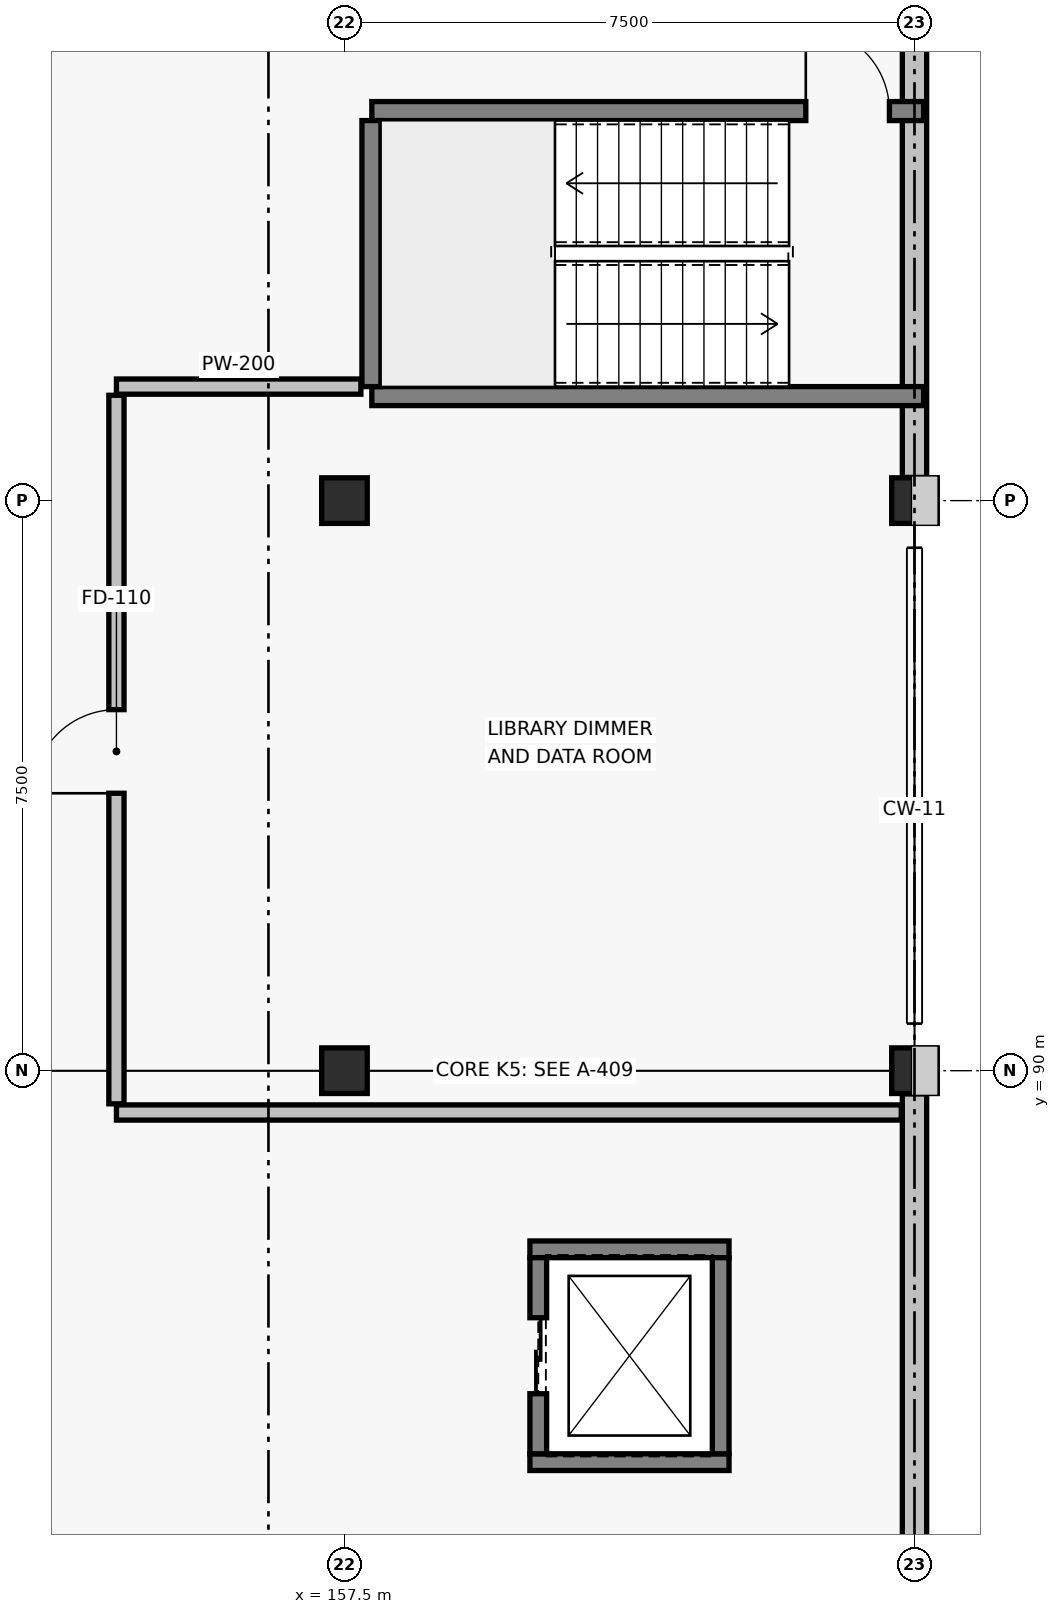
"""IFC4 building model, lengths in metres.
Left out: names, types, materials, properties, quantities, classifications, styles, units other than length and angle.
Written with IfcOpenShell. Run it as: python <this file> out.ifc"""

import sys

from ifc_helpers import new_model, si_unit, direction, frame, frame_2d, origin, origin_2d, place, context, subcontext, project, spatial, rectangle, extrude, element, fill, save


model = new_model("IFC4")
c1 = context("Model", 3, precision=1e-05, world=origin(), true_north=direction((0.0, 1.0)))
c2 = subcontext(c1, "Body", "Model", "MODEL_VIEW")
j1 = project(units=[si_unit("LENGTHUNIT", "METRE"), si_unit("PLANEANGLEUNIT", "RADIAN")], contexts=[c1])
p1 = place(None, origin())
s1 = spatial("IfcSite", under=j1, at=p1, CompositionType="ELEMENT")
p2 = place(p1, origin())
s2 = spatial("IfcBuilding", under=s1, at=p2, CompositionType="ELEMENT")
p3 = place(p2, frame((0.0, 0.0, 9.0)))
s3 = spatial("IfcBuildingStorey", under=s2, at=p3, CompositionType="ELEMENT", Elevation=9.0)
for number, where, z_axis, x_axis in (
    (1, (157.5, 90.0, 0.0), (0.0, 0.0, 1.0), (1.0, 0.0, 0.0)),
    (2, (157.5, 97.5, 0.0), (0.0, 0.0, 1.0), (1.0, 0.0, 0.0)),
    (3, (165.0, 90.0, 0.0), (0.0, 0.0, 1.0), (1.0, 0.0, 0.0)),
    (4, (165.0, 97.5, 0.0), (0.0, 0.0, 1.0), (1.0, 0.0, 0.0)),
):
    element("IfcColumn", number, at=place(p3, frame(where, z_axis=z_axis, x_axis=x_axis)), inside=s3, PredefinedType="COLUMN", context=c2, shape_type="SweptSolid", body=[
        extrude(rectangle(XDim=0.6, YDim=0.6, at=origin_2d()), origin(), (0.0, 0.0, 1.0), 4.2),
    ])
p4 = place(p3, frame((165.0, 82.805, 0.0), z_axis=(0.0, 0.0, 1.0), x_axis=(0.0, 1.0, 0.0)))
e5 = element("IfcWall", 5, at=p4, inside=s3, PredefinedType="SOLIDWALL", context=c2, shape_type="SweptSolid", body=[
    extrude(rectangle(XDim=6.89, YDim=0.32, at=frame_2d((3.445, 0.0))), origin(), (0.0, 0.0, 1.0), 2.82),
])
p5 = place(p3, frame((165.0, 97.805, 0.0), z_axis=(0.0, 0.0, 1.0), x_axis=(0.0, 1.0, 0.0)))
e6 = element("IfcWall", 6, at=p5, inside=s3, PredefinedType="SOLIDWALL", context=c2, shape_type="SweptSolid", body=[
    extrude(rectangle(XDim=6.89, YDim=0.32, at=frame_2d((3.445, 0.0))), origin(), (0.0, 0.0, 1.0), 3.02),
])
p6 = place(p3, frame((157.86, 98.875, 0.0), z_axis=(0.0, 0.0, 1.0), x_axis=(1.0, 0.0, 0.0)))
e7 = element("IfcWall", 7, at=p6, inside=s3, PredefinedType="SOLIDWALL", context=c2, shape_type="SweptSolid", body=[
    extrude(rectangle(XDim=7.26, YDim=0.25, at=frame_2d((3.63, 0.0))), origin(), (0.0, 0.0, 1.0), 3.92),
])
p7 = place(p3, frame((157.86, 102.625, 0.0), z_axis=(0.0, 0.0, 1.0), x_axis=(1.0, 0.0, 0.0)))
e8 = element("IfcWall", 8, at=p7, inside=s3, PredefinedType="SOLIDWALL", context=c2, shape_type="SweptSolid", body=[
    extrude(rectangle(XDim=7.26, YDim=0.25, at=frame_2d((3.63, 0.0))), origin(), (0.0, 0.0, 1.0), 3.92),
])
p8 = place(p7, frame((5.71, 0.0, 0.0)))
e9 = element("IfcOpeningElement", 9, at=p8, cuts=e8, PredefinedType="OPENING", context=c2, shape_type="SweptSolid", body=[
    extrude(rectangle(XDim=1.1, YDim=2.15, at=frame_2d((0.55, 1.075))), frame((0.0, 0.135, 0.0), z_axis=(0.0, -1.0, 0.0), x_axis=(1.0, 0.0, 0.0)), (0.0, 0.0, 1.0), 0.27),
])
p9 = place(p3, frame((157.855, 99.0, 0.0), z_axis=(0.0, 0.0, 1.0), x_axis=(0.0, 1.0, 0.0)))
e10 = element("IfcWall", 10, at=p9, inside=s3, PredefinedType="SOLIDWALL", context=c2, shape_type="SweptSolid", body=[
    extrude(rectangle(XDim=3.5, YDim=0.25, at=frame_2d((1.75, 0.0))), origin(), (0.0, 0.0, 1.0), 3.92),
])
for number, where, z_axis, x_axis in (
    (11, (159.94, 84.85, 0.0), (0.0, 0.0, 1.0), (1.0, 0.0, 0.0)),
    (12, (159.94, 87.65, 0.0), (0.0, 0.0, 1.0), (1.0, 0.0, 0.0)),
):
    element("IfcWall", number, at=place(p3, frame(where, z_axis=z_axis, x_axis=x_axis)), inside=s3, PredefinedType="SOLIDWALL", context=c2, shape_type="SweptSolid", body=[
        extrude(rectangle(XDim=2.62, YDim=0.22, at=frame_2d((1.31, 0.0))), origin(), (0.0, 0.0, 1.0), 3.92),
    ])
p10 = place(p3, frame((160.05, 84.96, 0.0), z_axis=(0.0, 0.0, 1.0), x_axis=(0.0, 1.0, 0.0)))
e13 = element("IfcWall", 13, at=p10, inside=s3, PredefinedType="SOLIDWALL", context=c2, shape_type="SweptSolid", body=[
    extrude(rectangle(XDim=2.58, YDim=0.22, at=frame_2d((1.29, 0.0))), origin(), (0.0, 0.0, 1.0), 3.92),
])
p11 = place(p10, frame((0.79, 0.0, 0.0)))
e14 = element("IfcOpeningElement", 14, at=p11, cuts=e13, PredefinedType="OPENING", context=c2, shape_type="SweptSolid", body=[
    extrude(rectangle(XDim=1.0, YDim=2.15, at=frame_2d((0.5, 1.075))), frame((0.0, 0.12, 0.0), z_axis=(0.0, -1.0, 0.0), x_axis=(1.0, 0.0, 0.0)), (0.0, 0.0, 1.0), 0.24),
])
p12 = place(p3, frame((162.45, 84.96, 0.0), z_axis=(0.0, 0.0, 1.0), x_axis=(0.0, 1.0, 0.0)))
e15 = element("IfcWall", 15, at=p12, inside=s3, PredefinedType="SOLIDWALL", context=c2, shape_type="SweptSolid", body=[
    extrude(rectangle(XDim=2.58, YDim=0.22, at=frame_2d((1.29, 0.0))), origin(), (0.0, 0.0, 1.0), 3.92),
])
p13 = place(p3, frame((154.5, 89.45, 0.0), z_axis=(0.0, 0.0, 1.0), x_axis=(1.0, 0.0, 0.0)))
e16 = element("IfcWall", 16, at=p13, inside=s3, PredefinedType="PARTITIONING", context=c2, shape_type="SweptSolid", body=[
    extrude(rectangle(XDim=10.326, YDim=0.2, at=frame_2d((5.163, 0.0))), origin(), (0.0, 0.0, 1.0), 2.97),
])
p14 = place(p3, frame((154.5, 99.0, 0.0), z_axis=(0.0, 0.0, 1.0), x_axis=(1.0, 0.0, 0.0)))
e17 = element("IfcWall", 17, at=p14, inside=s3, PredefinedType="PARTITIONING", context=c2, shape_type="SweptSolid", body=[
    extrude(rectangle(XDim=3.216, YDim=0.2, at=frame_2d((1.608, 0.0))), origin(), (0.0, 0.0, 1.0), 3.27),
])
p15 = place(p3, frame((154.5, 89.564, 0.0), z_axis=(0.0, 0.0, 1.0), x_axis=(0.0, 1.0, 0.0)))
e18 = element("IfcWall", 18, at=p15, inside=s3, PredefinedType="PARTITIONING", context=c2, shape_type="SweptSolid", body=[
    extrude(rectangle(XDim=9.322, YDim=0.2, at=frame_2d((4.661, 0.0))), origin(), (0.0, 0.0, 1.0), 2.92),
])
p16 = place(p15, frame((4.086, 0.0, 0.0)))
e19 = element("IfcOpeningElement", 19, at=p16, cuts=e18, PredefinedType="OPENING", context=c2, shape_type="SweptSolid", body=[
    extrude(rectangle(XDim=1.1, YDim=2.15, at=frame_2d((0.55, 1.075))), frame((0.0, 0.11, 0.0), z_axis=(0.0, -1.0, 0.0), x_axis=(1.0, 0.0, 0.0)), (0.0, 0.0, 1.0), 0.22),
])
p17 = place(p8, origin())
e20 = element("IfcDoor", 20, at=p17, inside=s3, OperationType="SINGLE_SWING_LEFT", PredefinedType="DOOR", context=c2, shape_type="SweptSolid", body=[
    extrude(rectangle(XDim=1.1, YDim=2.15, at=frame_2d((0.55, 1.075))), frame((0.0, 0.025, 0.0), z_axis=(0.0, -1.0, 0.0), x_axis=(1.0, 0.0, 0.0)), (0.0, 0.0, 1.0), 0.05),
])
fill(e9, e20)
p18 = place(p11, origin())
e21 = element("IfcDoor", 21, at=p18, inside=s3, OperationType="SLIDING_TO_LEFT", PredefinedType="DOOR", context=c2, shape_type="SweptSolid", body=[
    extrude(rectangle(XDim=1.0, YDim=2.15, at=frame_2d((0.5, 1.075))), frame((0.0, 0.025, 0.0), z_axis=(0.0, -1.0, 0.0), x_axis=(1.0, 0.0, 0.0)), (0.0, 0.0, 1.0), 0.05),
])
fill(e14, e21)
p19 = place(p16, origin())
e22 = element("IfcDoor", 22, at=p19, inside=s3, OperationType="SINGLE_SWING_LEFT", PredefinedType="DOOR", context=c2, shape_type="SweptSolid", body=[
    extrude(rectangle(XDim=1.1, YDim=2.15, at=frame_2d((0.55, 1.075))), frame((0.0, 0.025, 0.0), z_axis=(0.0, -1.0, 0.0), x_axis=(1.0, 0.0, 0.0)), (0.0, 0.0, 1.0), 0.05),
])
fill(e19, e22)
save(model, sys.argv[1])
